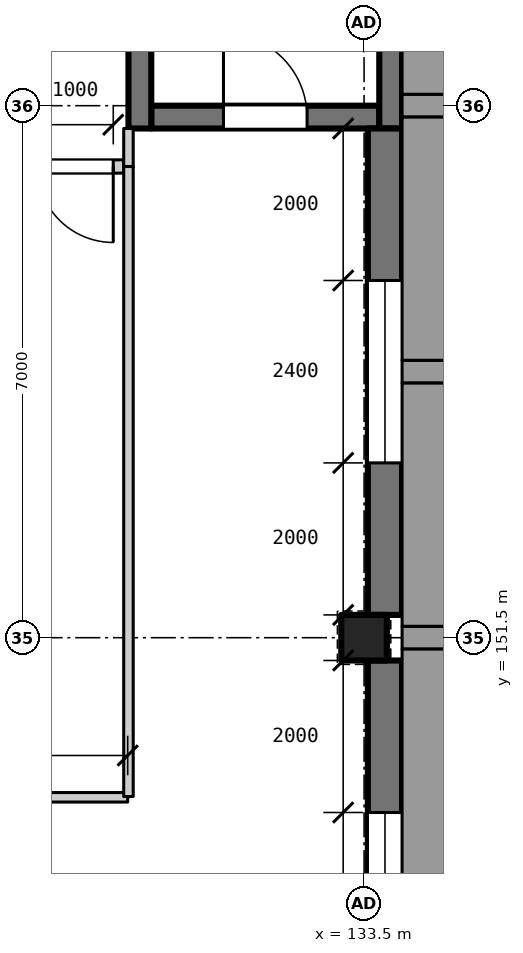
"""IFC4 building model, lengths in metres.
Left out: names, types, materials, properties, quantities, classifications, styles, units other than length and angle.
Written with IfcOpenShell. Run it as: python <this file> out.ifc"""

import sys

from ifc_helpers import new_model, si_unit, direction, frame, frame_2d, origin, origin_2d, place, context, subcontext, project, spatial, rectangle, extrude, element, fill, save


model = new_model("IFC4")
c1 = context("Model", 3, precision=1e-05, world=origin(), true_north=direction((0.0, 1.0)))
c2 = subcontext(c1, "Body", "Model", "MODEL_VIEW")
j1 = project(units=[si_unit("LENGTHUNIT", "METRE"), si_unit("PLANEANGLEUNIT", "RADIAN")], contexts=[c1])
p1 = place(None, origin())
s1 = spatial("IfcSite", under=j1, at=p1, CompositionType="ELEMENT")
p2 = place(p1, origin())
s2 = spatial("IfcBuilding", under=s1, at=p2, CompositionType="ELEMENT")
p3 = place(p2, frame((0.0, 0.0, 10.2)))
s3 = spatial("IfcBuildingStorey", under=s2, at=p3, CompositionType="ELEMENT", Elevation=10.2)
p4 = place(p3, frame((133.5, 151.5, 0.0), z_axis=(0.0, 0.0, 1.0), x_axis=(1.0, 0.0, 0.0)))
e1 = element("IfcColumn", 1, at=p4, inside=s3, PredefinedType="COLUMN", context=c2, shape_type="SweptSolid", body=[
    extrude(rectangle(XDim=0.6, YDim=0.6, at=origin_2d()), origin(), (0.0, 0.0, 1.0), 4.2),
])
p5 = place(p3, frame((130.7, 158.35, 0.0), z_axis=(0.0, 0.0, 1.0), x_axis=(1.0, 0.0, 0.0)))
e2 = element("IfcWall", 2, at=p5, inside=s3, PredefinedType="SHEAR", context=c2, shape_type="SweptSolid", body=[
    extrude(rectangle(XDim=3.0, YDim=0.3, at=frame_2d((1.5, 0.0))), origin(), (0.0, 0.0, 1.0), 4.2),
])
p6 = place(p5, frame((0.95, 0.0, 0.0)))
e3 = element("IfcOpeningElement", 3, at=p6, cuts=e2, PredefinedType="OPENING", context=c2, shape_type="SweptSolid", body=[
    extrude(rectangle(XDim=1.1, YDim=2.1, at=frame_2d((0.55, 1.05))), frame((0.0, 0.16, 0.0), z_axis=(0.0, -1.0, 0.0), x_axis=(1.0, 0.0, 0.0)), (0.0, 0.0, 1.0), 0.32),
])
p7 = place(p3, frame((130.55, 158.2, 0.0), z_axis=(0.0, 0.0, 1.0), x_axis=(0.0, 1.0, 0.0)))
e4 = element("IfcWall", 4, at=p7, inside=s3, PredefinedType="SHEAR", context=c2, shape_type="SweptSolid", body=[
    extrude(rectangle(XDim=7.5, YDim=0.3, at=frame_2d((3.75, 0.0))), origin(), (0.0, 0.0, 1.0), 4.2),
])
p8 = place(p3, frame((133.85, 165.7, 0.0), z_axis=(0.0, 0.0, 1.0), x_axis=(0.0, -1.0, 0.0)))
e5 = element("IfcWall", 5, at=p8, inside=s3, PredefinedType="SOLIDWALL", context=c2, shape_type="SweptSolid", body=[
    extrude(rectangle(XDim=7.5, YDim=0.3, at=frame_2d((3.75, 0.0))), origin(), (0.0, 0.0, 1.0), 3.9),
])
p9 = place(p3, frame((133.775, 151.2, 0.0), z_axis=(0.0, 0.0, 1.0), x_axis=(0.0, -1.0, 0.0)))
e6 = element("IfcWall", 6, at=p9, inside=s3, PredefinedType="SOLIDWALL", context=c2, shape_type="SweptSolid", body=[
    extrude(rectangle(XDim=6.4, YDim=0.45, at=frame_2d((3.2, 0.0))), origin(), (0.0, 0.0, 1.0), 3.2),
])
p10 = place(p9, frame((2.0, 0.0, 0.9)))
e7 = element("IfcOpeningElement", 7, at=p10, cuts=e6, PredefinedType="OPENING", context=c2, shape_type="SweptSolid", body=[
    extrude(rectangle(XDim=2.4, YDim=1.6, at=frame_2d((1.2, 0.8))), frame((0.0, 0.235, 0.0), z_axis=(0.0, -1.0, 0.0), x_axis=(1.0, 0.0, 0.0)), (0.0, 0.0, 1.0), 0.47),
])
p11 = place(p3, frame((133.775, 158.2, 0.0), z_axis=(0.0, 0.0, 1.0), x_axis=(0.0, -1.0, 0.0)))
e8 = element("IfcWall", 8, at=p11, inside=s3, PredefinedType="SOLIDWALL", context=c2, shape_type="SweptSolid", body=[
    extrude(rectangle(XDim=6.4, YDim=0.45, at=frame_2d((3.2, 0.0))), origin(), (0.0, 0.0, 1.0), 3.2),
])
p12 = place(p11, frame((2.0, 0.0, 0.9)))
e9 = element("IfcOpeningElement", 9, at=p12, cuts=e8, PredefinedType="OPENING", context=c2, shape_type="SweptSolid", body=[
    extrude(rectangle(XDim=2.4, YDim=1.6, at=frame_2d((1.2, 0.8))), frame((0.0, 0.235, 0.0), z_axis=(0.0, -1.0, 0.0), x_axis=(1.0, 0.0, 0.0)), (0.0, 0.0, 1.0), 0.47),
])
p13 = place(p3, frame((120.6, 149.4, 0.0), z_axis=(0.0, 0.0, 1.0), x_axis=(1.0, 0.0, 0.0)))
e10 = element("IfcWall", 10, at=p13, inside=s3, PredefinedType="PARTITIONING", context=c2, shape_type="SweptSolid", body=[
    extrude(rectangle(XDim=9.79, YDim=0.125, at=frame_2d((4.895, 0.0))), origin(), (0.0, 0.0, 1.0), 3.9),
])
p14 = place(p13, frame((4.4, 0.0, 0.0)))
e11 = element("IfcOpeningElement", 11, at=p14, cuts=e10, PredefinedType="OPENING", context=c2, shape_type="SweptSolid", body=[
    extrude(rectangle(XDim=1.0, YDim=2.1, at=frame_2d((0.5, 1.05))), frame((0.0, 0.073, 0.0), z_axis=(0.0, -1.0, 0.0), x_axis=(1.0, 0.0, 0.0)), (0.0, 0.0, 1.0), 0.145),
])
p15 = place(p3, frame((120.6, 157.7, 0.0), z_axis=(0.0, 0.0, 1.0), x_axis=(1.0, 0.0, 0.0)))
e12 = element("IfcWall", 12, at=p15, inside=s3, PredefinedType="PARTITIONING", context=c2, shape_type="SweptSolid", body=[
    extrude(rectangle(XDim=9.737, YDim=0.175, at=frame_2d((4.869, 0.0))), origin(), (0.0, 0.0, 1.0), 3.9),
])
p16 = place(p15, frame((8.6, 0.0, 0.0)))
e13 = element("IfcOpeningElement", 13, at=p16, cuts=e12, PredefinedType="OPENING", context=c2, shape_type="SweptSolid", body=[
    extrude(rectangle(XDim=1.0, YDim=2.1, at=frame_2d((0.5, 1.05))), frame((0.0, 0.097, 0.0), z_axis=(0.0, -1.0, 0.0), x_axis=(1.0, 0.0, 0.0)), (0.0, 0.0, 1.0), 0.195),
])
p17 = place(p3, frame((130.4, 149.41, 0.0), z_axis=(0.0, 0.0, 1.0), x_axis=(0.0, 1.0, 0.0)))
e14 = element("IfcWall", 14, at=p17, inside=s3, PredefinedType="PARTITIONING", context=c2, shape_type="SweptSolid", body=[
    extrude(rectangle(XDim=8.29, YDim=0.125, at=frame_2d((4.145, 0.0))), origin(), (0.0, 0.0, 1.0), 3.9),
])
p18 = place(p3, frame((130.4, 157.7, 0.0), z_axis=(0.0, 0.0, 1.0), x_axis=(0.0, 1.0, 0.0)))
e15 = element("IfcWall", 15, at=p18, inside=s3, PredefinedType="PARTITIONING", context=c2, shape_type="SweptSolid", body=[
    extrude(rectangle(XDim=0.5, YDim=0.125, at=frame_2d((0.25, 0.0))), origin(), (0.0, 0.0, 1.0), 3.9),
])
p19 = place(p10, origin())
e16 = element("IfcWindow", 16, at=p19, inside=s3, PartitioningType="SINGLE_PANEL", PredefinedType="WINDOW", context=c2, shape_type="SweptSolid", body=[
    extrude(rectangle(XDim=2.4, YDim=1.6, at=frame_2d((1.2, 0.8))), frame((0.0, -0.125, 0.0), z_axis=(0.0, -1.0, 0.0), x_axis=(1.0, 0.0, 0.0)), (0.0, 0.0, 1.0), 0.06),
])
fill(e7, e16)
p20 = place(p12, origin())
e17 = element("IfcWindow", 17, at=p20, inside=s3, PartitioningType="SINGLE_PANEL", PredefinedType="WINDOW", context=c2, shape_type="SweptSolid", body=[
    extrude(rectangle(XDim=2.4, YDim=1.6, at=frame_2d((1.2, 0.8))), frame((0.0, -0.125, 0.0), z_axis=(0.0, -1.0, 0.0), x_axis=(1.0, 0.0, 0.0)), (0.0, 0.0, 1.0), 0.06),
])
fill(e9, e17)
p21 = place(p16, frame((1.0, 0.0, 0.0), z_axis=(0.0, 0.0, 1.0), x_axis=(-1.0, 0.0, 0.0)))
e18 = element("IfcDoor", 18, at=p21, inside=s3, OperationType="SINGLE_SWING_LEFT", PredefinedType="DOOR", context=c2, shape_type="SweptSolid", body=[
    extrude(rectangle(XDim=1.0, YDim=2.1, at=frame_2d((0.5, 1.05))), frame((0.0, 0.025, 0.0), z_axis=(0.0, -1.0, 0.0), x_axis=(1.0, 0.0, 0.0)), (0.0, 0.0, 1.0), 0.05),
])
fill(e13, e18)
p22 = place(p6, origin())
e19 = element("IfcDoor", 19, at=p22, inside=s3, OperationType="SINGLE_SWING_LEFT", PredefinedType="DOOR", context=c2, shape_type="SweptSolid", body=[
    extrude(rectangle(XDim=1.1, YDim=2.1, at=frame_2d((0.55, 1.05))), frame((0.0, 0.025, 0.0), z_axis=(0.0, -1.0, 0.0), x_axis=(1.0, 0.0, 0.0)), (0.0, 0.0, 1.0), 0.05),
])
fill(e3, e19)
save(model, sys.argv[1])
